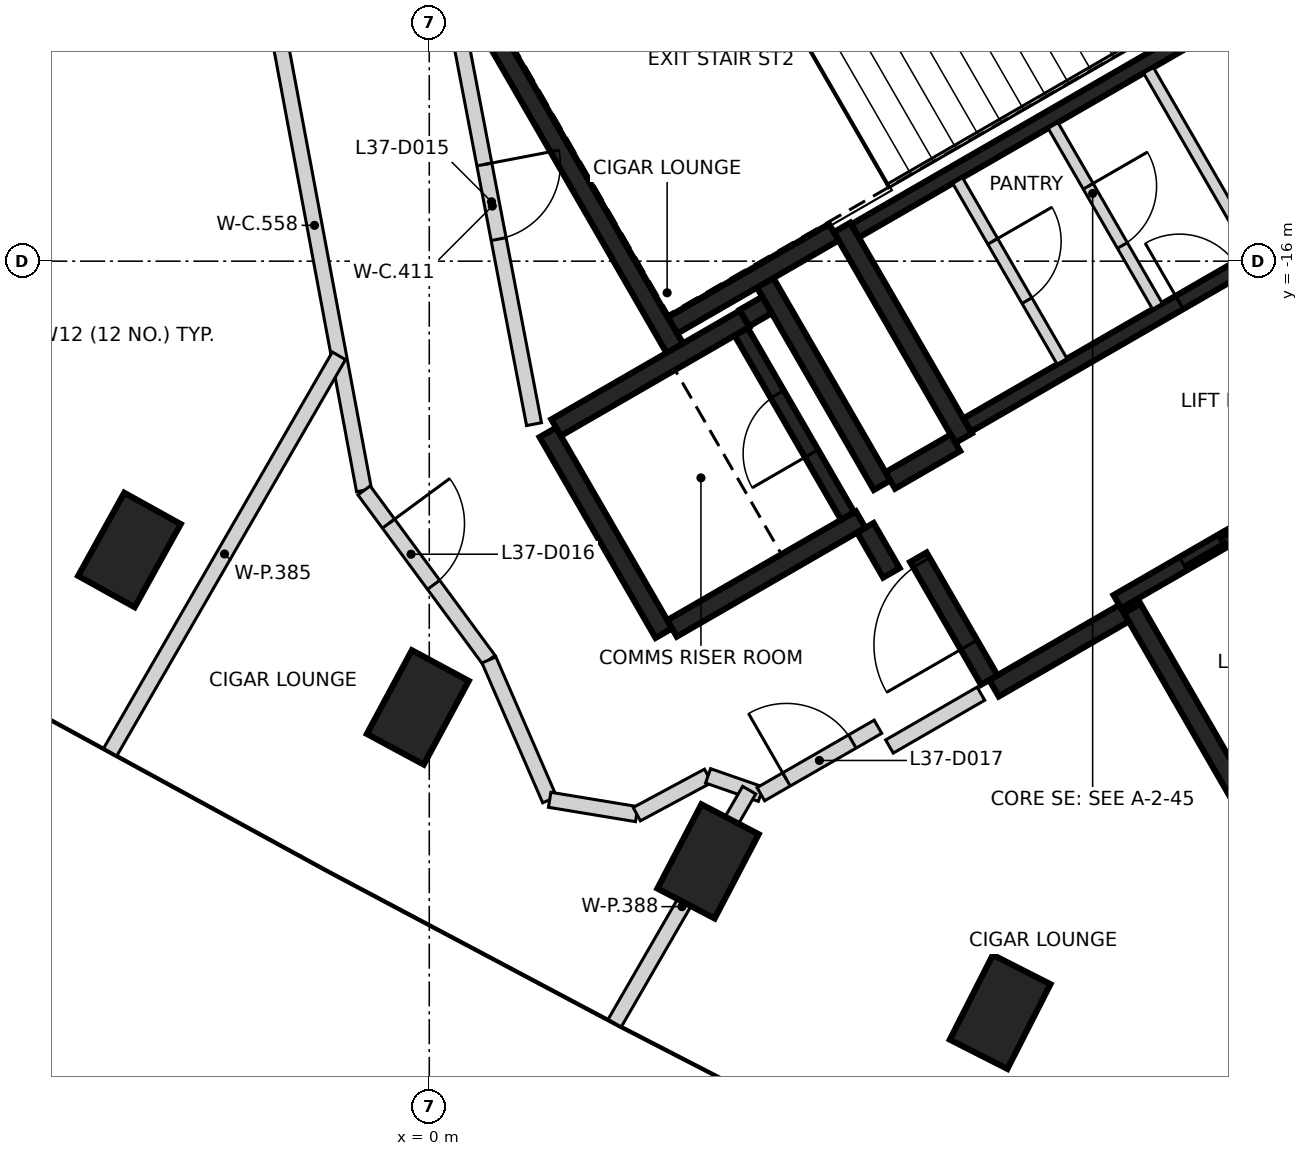
"""IFC4 building model, lengths in metres.
Left out: names, types, materials, properties, quantities, classifications, styles, units other than length and angle.
Written with IfcOpenShell. Run it as: python <this file> out.ifc"""

import sys

from ifc_helpers import new_model, si_unit, direction, frame, frame_2d, origin, origin_2d, place, context, subcontext, project, spatial, rectangle, extrude, element, fill, save


model = new_model("IFC4")
c1 = context("Model", 3, precision=1e-05, world=origin(), true_north=direction((0.0, 1.0)))
c2 = subcontext(c1, "Body", "Model", "MODEL_VIEW")
j1 = project(units=[si_unit("LENGTHUNIT", "METRE"), si_unit("PLANEANGLEUNIT", "RADIAN")], contexts=[c1])
p1 = place(None, origin())
s1 = spatial("IfcSite", under=j1, at=p1, CompositionType="ELEMENT")
p2 = place(p1, origin())
s2 = spatial("IfcBuilding", under=s1, at=p2, CompositionType="ELEMENT")
p3 = place(p2, frame((0.0, 0.0, 150.4)))
s3 = spatial("IfcBuildingStorey", under=s2, at=p3, CompositionType="ELEMENT", Elevation=150.4)
for number, where, z_axis, x_axis in (
    (1, (-3.945, -19.8, -0.4), (0.0, 0.0, 1.0), (0.485, 0.875, 0.0)),
    (2, (-0.151, -21.871, -0.4), (0.0, 0.0, 1.0), (0.474, 0.881, 0.0)),
    (3, (3.667, -23.896, -0.4), (0.0, 0.0, 1.0), (0.463, 0.886, 0.0)),
    (4, (7.51, -25.876, -0.4), (0.0, 0.0, 1.0), (0.453, 0.892, 0.0)),
):
    element("IfcColumn", number, at=place(p3, frame(where, z_axis=z_axis, x_axis=x_axis)), inside=s3, PredefinedType="COLUMN", context=c2, shape_type="SweptSolid", body=[
        extrude(rectangle(XDim=1.25, YDim=0.85, at=origin_2d()), origin(), (0.0, 0.0, 1.0), 3.6),
    ])
p4 = place(p3, frame((3.235, -17.153, 0.0), z_axis=(0.0, 0.0, 1.0), x_axis=(-0.500008851346, 0.866020293397, 0.0)))
e5 = element("IfcWall", 5, at=p4, inside=s3, PredefinedType="SHEAR", context=c2, shape_type="SweptSolid", body=[
    extrude(rectangle(XDim=5.51, YDim=0.25, at=frame_2d((2.755, 0.0))), origin(), (0.0, 0.0, 1.0), 3.2),
])
p5 = place(p3, frame((7.031, -18.327, 0.0), z_axis=(0.0, 0.0, 1.0), x_axis=(-0.499971222258, 0.866042017984, 0.0)))
e6 = element("IfcWall", 6, at=p5, inside=s3, PredefinedType="SHEAR", context=c2, shape_type="SweptSolid", body=[
    extrude(rectangle(XDim=3.2, YDim=0.25, at=frame_2d((1.6, 0.0))), origin(), (0.0, 0.0, 1.0), 3.2),
])
p6 = place(p3, frame((10.736, -23.145, 0.0), z_axis=(0.0, 0.0, 1.0), x_axis=(-0.500023226632, 0.866011993467, 0.0)))
e7 = element("IfcWall", 7, at=p6, inside=s3, PredefinedType="SHEAR", context=c2, shape_type="SweptSolid", body=[
    extrude(rectangle(XDim=2.974, YDim=0.25, at=frame_2d((1.487, 0.0))), origin(), (0.0, 0.0, 1.0), 3.2),
])
p7 = place(p3, frame((3.085, -20.894, 0.0), z_axis=(0.0, 0.0, 1.0), x_axis=(-0.499978833458, 0.866037623948, 0.0)))
e8 = element("IfcWall", 8, at=p7, inside=s3, PredefinedType="SHEAR", context=c2, shape_type="SweptSolid", body=[
    extrude(rectangle(XDim=3.05, YDim=0.25, at=frame_2d((1.525, 0.0))), origin(), (0.0, 0.0, 1.0), 3.2),
])
p8 = place(p3, frame((1.669, -18.19, 0.0), z_axis=(0.0, 0.0, 1.0), x_axis=(0.866042235819, 0.499970844928, 0.0)))
e9 = element("IfcWall", 9, at=p8, inside=s3, PredefinedType="SHEAR", context=c2, shape_type="SweptSolid", body=[
    extrude(rectangle(XDim=2.865, YDim=0.25, at=frame_2d((1.432, 0.0))), origin(), (0.0, 0.0, 1.0), 3.2),
])
p9 = place(p3, frame((5.675, -19.399, 0.0), z_axis=(0.0, 0.0, 1.0), x_axis=(-0.866026637627, -0.499997862916, 0.0)))
e10 = element("IfcWall", 10, at=p9, inside=s3, PredefinedType="SHEAR", context=c2, shape_type="SweptSolid", body=[
    extrude(rectangle(XDim=2.865, YDim=0.25, at=frame_2d((1.432, 0.0))), origin(), (0.0, 0.0, 1.0), 3.2),
])
p10 = place(p3, frame((4.414, -16.276, 0.0), z_axis=(0.0, 0.0, 1.0), x_axis=(0.500003324108, -0.866023484601, 0.0)))
e11 = element("IfcWall", 11, at=p10, inside=s3, PredefinedType="SHEAR", context=c2, shape_type="SweptSolid", body=[
    extrude(rectangle(XDim=3.085, YDim=0.25, at=frame_2d((1.542, 0.0))), origin(), (0.0, 0.0, 1.0), 3.2),
])
p11 = place(p3, frame((5.322, -15.619, 0.0), z_axis=(0.0, 0.0, 1.0), x_axis=(-0.866026229868, -0.499998569178, 0.0)))
e12 = element("IfcWall", 12, at=p11, inside=s3, PredefinedType="SHEAR", context=c2, shape_type="SweptSolid", body=[
    extrude(rectangle(XDim=2.449, YDim=0.25, at=frame_2d((1.225, 0.0))), origin(), (0.0, 0.0, 1.0), 3.2),
])
p12 = place(p3, frame((9.14, -20.631, 0.0), z_axis=(0.0, 0.0, 1.0), x_axis=(-0.866043531843, -0.499968599967, 0.0)))
e13 = element("IfcWall", 13, at=p12, inside=s3, PredefinedType="SHEAR", context=c2, shape_type="SweptSolid", body=[
    extrude(rectangle(XDim=1.975, YDim=0.25, at=frame_2d((0.987, 0.0))), origin(), (0.0, 0.0, 1.0), 3.2),
])
p13 = place(p3, frame((7.367, -21.51, 0.0), z_axis=(0.0, 0.0, 1.0), x_axis=(-0.499983108224, 0.866035156036, 0.0)))
e14 = element("IfcWall", 14, at=p13, inside=s3, PredefinedType="SHEAR", context=c2, shape_type="SweptSolid", body=[
    extrude(rectangle(XDim=1.865, YDim=0.25, at=frame_2d((0.932, 0.0))), origin(), (0.0, 0.0, 1.0), 3.2),
])
p14 = place(p13, frame((0.535, 0.0, 0.0)))
e15 = element("IfcOpeningElement", 15, at=p14, cuts=e14, PredefinedType="OPENING", context=c2, shape_type="SweptSolid", body=[
    extrude(rectangle(XDim=1.25, YDim=2.1, at=frame_2d((0.625, 1.05))), frame((0.0, 0.135, 0.0), z_axis=(0.0, -1.0, 0.0), x_axis=(1.0, 0.0, 0.0)), (0.0, 0.0, 1.0), 0.27),
])
p15 = place(p3, frame((6.065, -18.885, 0.0), z_axis=(0.0, 0.0, 1.0), x_axis=(0.866017078145, 0.500014420154, 0.0)))
e16 = element("IfcWall", 16, at=p15, inside=s3, PredefinedType="SHEAR", context=c2, shape_type="SweptSolid", body=[
    extrude(rectangle(XDim=0.989, YDim=0.25, at=frame_2d((0.495, 0.0))), origin(), (0.0, 0.0, 1.0), 3.2),
])
p16 = place(p3, frame((6.08, -20.1, 0.0), z_axis=(0.0, 0.0, 1.0), x_axis=(-0.500051773299, 0.865995510393, 0.0)))
e17 = element("IfcWall", 17, at=p16, inside=s3, PredefinedType="SHEAR", context=c2, shape_type="SweptSolid", body=[
    extrude(rectangle(XDim=0.685, YDim=0.25, at=frame_2d((0.342, 0.0))), origin(), (0.0, 0.0, 1.0), 3.2),
])
p17 = place(p3, frame((4.145, -16.749, 0.0), z_axis=(0.0, 0.0, 1.0), x_axis=(0.866185586049, 0.49972245349, 0.0)))
e18 = element("IfcWall", 18, at=p17, inside=s3, PredefinedType="SHEAR", context=c2, shape_type="SweptSolid", body=[
    extrude(rectangle(XDim=0.344, YDim=0.25, at=frame_2d((0.172, 0.0))), origin(), (0.0, 0.0, 1.0), 3.2),
])
p18 = place(p3, frame((9.052, -20.48, 0.0), z_axis=(0.0, 0.0, 1.0), x_axis=(0.866030299012, 0.499991521122, 0.0)))
e19 = element("IfcWall", 19, at=p18, inside=s3, PredefinedType="SHEAR", context=c2, shape_type="SweptSolid", body=[
    extrude(rectangle(XDim=6.1, YDim=0.2, at=frame_2d((3.05, 0.0))), origin(), (0.0, 0.0, 1.0), 3.2),
])
p19 = place(p18, frame((1.0, 0.0, 0.0)))
e20 = element("IfcOpeningElement", 20, at=p19, cuts=e19, PredefinedType="OPENING", context=c2, shape_type="SweptSolid", body=[
    extrude(rectangle(XDim=1.2, YDim=2.1, at=frame_2d((0.6, 1.05))), frame((0.0, 0.11, 0.0), z_axis=(0.0, -1.0, 0.0), x_axis=(1.0, 0.0, 0.0)), (0.0, 0.0, 1.0), 0.22),
])
p20 = place(p18, frame((4.05, 0.0, 0.0)))
e21 = element("IfcOpeningElement", 21, at=p20, cuts=e19, PredefinedType="OPENING", context=c2, shape_type="SweptSolid", body=[
    extrude(rectangle(XDim=1.2, YDim=2.1, at=frame_2d((0.6, 1.05))), frame((0.0, 0.11, 0.0), z_axis=(0.0, -1.0, 0.0), x_axis=(1.0, 0.0, 0.0)), (0.0, 0.0, 1.0), 0.22),
])
p21 = place(p3, frame((10.538, -12.752, 0.0), z_axis=(0.0, 0.0, 1.0), x_axis=(-0.866038630372, -0.499977090179, 0.0)))
e22 = element("IfcWall", 22, at=p21, inside=s3, PredefinedType="SHEAR", context=c2, shape_type="SweptSolid", body=[
    extrude(rectangle(XDim=5.699, YDim=0.2, at=frame_2d((2.85, 0.0))), origin(), (0.0, 0.0, 1.0), 3.2),
])
p22 = place(p3, frame((7.077, -18.156, 0.0), z_axis=(0.0, 0.0, 1.0), x_axis=(0.866038630372, 0.499977090179, 0.0)))
e23 = element("IfcWall", 23, at=p22, inside=s3, PredefinedType="SHEAR", context=c2, shape_type="SweptSolid", body=[
    extrude(rectangle(XDim=5.699, YDim=0.2, at=frame_2d((2.85, 0.0))), origin(), (0.0, 0.0, 1.0), 3.2),
])
p23 = place(p22, frame((3.224, 0.0, 0.0)))
e24 = element("IfcOpeningElement", 24, at=p23, cuts=e23, PredefinedType="OPENING", context=c2, shape_type="SweptSolid", body=[
    extrude(rectangle(XDim=0.9, YDim=2.1, at=frame_2d((0.45, 1.05))), frame((0.0, 0.11, 0.0), z_axis=(0.0, -1.0, 0.0), x_axis=(1.0, 0.0, 0.0)), (0.0, 0.0, 1.0), 0.22),
])
p24 = place(p22, frame((4.599, 0.0, 0.0)))
e25 = element("IfcOpeningElement", 25, at=p24, cuts=e23, PredefinedType="OPENING", context=c2, shape_type="SweptSolid", body=[
    extrude(rectangle(XDim=0.9, YDim=2.1, at=frame_2d((0.45, 1.05))), frame((0.0, 0.11, 0.0), z_axis=(0.0, -1.0, 0.0), x_axis=(1.0, 0.0, 0.0)), (0.0, 0.0, 1.0), 0.22),
])
p25 = place(p3, frame((5.503, -19.352, 0.0), z_axis=(0.0, 0.0, 1.0), x_axis=(-0.499986818241, 0.866033014143, 0.0)))
e26 = element("IfcWall", 26, at=p25, inside=s3, PredefinedType="SHEAR", context=c2, shape_type="SweptSolid", body=[
    extrude(rectangle(XDim=2.798, YDim=0.2, at=frame_2d((1.399, 0.0))), origin(), (0.0, 0.0, 1.0), 3.2),
])
p26 = place(p25, frame((0.949, 0.0, 0.0)))
e27 = element("IfcOpeningElement", 27, at=p26, cuts=e26, PredefinedType="OPENING", context=c2, shape_type="SweptSolid", body=[
    extrude(rectangle(XDim=0.9, YDim=2.1, at=frame_2d((0.45, 1.05))), frame((0.0, 0.11, 0.0), z_axis=(0.0, -1.0, 0.0), x_axis=(1.0, 0.0, 0.0)), (0.0, 0.0, 1.0), 0.22),
])
p27 = place(p3, frame((11.963, -15.22, 0.0), z_axis=(0.0, 0.0, 1.0), x_axis=(-0.500034990121, 0.866005201286, 0.0)))
e28 = element("IfcWall", 28, at=p27, inside=s3, PredefinedType="SHEAR", context=c2, shape_type="SweptSolid", body=[
    extrude(rectangle(XDim=2.75, YDim=0.2, at=frame_2d((1.375, 0.0))), origin(), (0.0, 0.0, 1.0), 3.2),
])
p28 = place(p3, frame((8.207, -14.214, 0.0), z_axis=(0.0, 0.0, 1.0), x_axis=(0.50002746344, -0.86600954718, 0.0)))
e29 = element("IfcWall", 29, at=p28, inside=s3, PredefinedType="PARTITIONING", context=c2, shape_type="SweptSolid", body=[
    extrude(rectangle(XDim=2.748, YDim=0.15, at=frame_2d((1.374, 0.0))), origin(), (0.0, 0.0, 1.0), 3.2),
])
p29 = place(p28, frame((0.924, 0.0, 0.0)))
e30 = element("IfcOpeningElement", 30, at=p29, cuts=e29, PredefinedType="OPENING", context=c2, shape_type="SweptSolid", body=[
    extrude(rectangle(XDim=0.9, YDim=2.1, at=frame_2d((0.45, 1.05))), frame((0.0, 0.085, 0.0), z_axis=(0.0, -1.0, 0.0), x_axis=(1.0, 0.0, 0.0)), (0.0, 0.0, 1.0), 0.17),
])
p30 = place(p3, frame((9.462, -13.489, 0.0), z_axis=(0.0, 0.0, 1.0), x_axis=(0.499988999718, -0.866031754707, 0.0)))
e31 = element("IfcWall", 31, at=p30, inside=s3, PredefinedType="PARTITIONING", context=c2, shape_type="SweptSolid", body=[
    extrude(rectangle(XDim=2.749, YDim=0.15, at=frame_2d((1.374, 0.0))), origin(), (0.0, 0.0, 1.0), 3.2),
])
p31 = place(p3, frame((6.951, -14.939, 0.0), z_axis=(0.0, 0.0, 1.0), x_axis=(0.499988999718, -0.866031754707, 0.0)))
e32 = element("IfcWall", 32, at=p31, inside=s3, PredefinedType="PARTITIONING", context=c2, shape_type="SweptSolid", body=[
    extrude(rectangle(XDim=2.749, YDim=0.15, at=frame_2d((1.374, 0.0))), origin(), (0.0, 0.0, 1.0), 3.2),
])
p32 = place(p31, frame((0.924, 0.0, 0.0)))
e33 = element("IfcOpeningElement", 33, at=p32, cuts=e32, PredefinedType="OPENING", context=c2, shape_type="SweptSolid", body=[
    extrude(rectangle(XDim=0.9, YDim=2.1, at=frame_2d((0.45, 1.05))), frame((0.0, 0.085, 0.0), z_axis=(0.0, -1.0, 0.0), x_axis=(1.0, 0.0, 0.0)), (0.0, 0.0, 1.0), 0.17),
])
p33 = place(p3, frame((-2.162, -12.042, 0.0), z_axis=(0.0, 0.0, 1.0), x_axis=(0.18377734651, -0.982967897192, 0.0)))
e34 = element("IfcWall", 34, at=p33, inside=s3, PredefinedType="PARTITIONING", context=c2, shape_type="SweptSolid", body=[
    extrude(rectangle(XDim=7.094, YDim=0.2, at=frame_2d((3.547, 0.0))), origin(), (0.0, 0.0, 1.0), 3.2),
])
p34 = place(p3, frame((-0.858, -19.016, 0.0), z_axis=(0.0, 0.0, 1.0), x_axis=(0.593123867414, -0.805111220829, 0.0)))
e35 = element("IfcWall", 35, at=p34, inside=s3, PredefinedType="PARTITIONING", context=c2, shape_type="SweptSolid", body=[
    extrude(rectangle(XDim=2.77, YDim=0.2, at=frame_2d((1.385, 0.0))), origin(), (0.0, 0.0, 1.0), 3.2),
])
p35 = place(p34, frame((0.542, 0.0, 0.0)))
e36 = element("IfcOpeningElement", 36, at=p35, cuts=e35, PredefinedType="OPENING", context=c2, shape_type="SweptSolid", body=[
    extrude(rectangle(XDim=1.0, YDim=2.1, at=frame_2d((0.5, 1.05))), frame((0.0, 0.11, 0.0), z_axis=(0.0, -1.0, 0.0), x_axis=(1.0, 0.0, 0.0)), (0.0, 0.0, 1.0), 0.22),
])
p36 = place(p3, frame((0.281, -12.406, 0.0), z_axis=(0.0, 0.0, 1.0), x_axis=(0.187814940093, -0.982204433037, 0.0)))
e37 = element("IfcWall", 37, at=p36, inside=s3, PredefinedType="PARTITIONING", context=c2, shape_type="SweptSolid", body=[
    extrude(rectangle(XDim=5.842, YDim=0.2, at=frame_2d((2.921, 0.0))), origin(), (0.0, 0.0, 1.0), 3.2),
])
p37 = place(p36, frame((2.363, 0.0, 0.0)))
e38 = element("IfcOpeningElement", 38, at=p37, cuts=e37, PredefinedType="OPENING", context=c2, shape_type="SweptSolid", body=[
    extrude(rectangle(XDim=1.0, YDim=2.1, at=frame_2d((0.5, 1.05))), frame((0.0, 0.11, 0.0), z_axis=(0.0, -1.0, 0.0), x_axis=(1.0, 0.0, 0.0)), (0.0, 0.0, 1.0), 0.22),
])
p38 = place(p3, frame((0.785, -21.246, 0.0), z_axis=(0.0, 0.0, 1.0), x_axis=(0.398365586627, -0.917226721913, 0.0)))
e39 = element("IfcWall", 39, at=p38, inside=s3, PredefinedType="PARTITIONING", context=c2, shape_type="SweptSolid", body=[
    extrude(rectangle(XDim=2.006, YDim=0.2, at=frame_2d((1.003, 0.0))), origin(), (0.0, 0.0, 1.0), 2.3),
])
p39 = place(p3, frame((1.584, -23.086, 0.0), z_axis=(0.0, 0.0, 1.0), x_axis=(0.986654221629, -0.162829502674, 0.0)))
e40 = element("IfcWall", 40, at=p39, inside=s3, PredefinedType="PARTITIONING", context=c2, shape_type="SweptSolid", body=[
    extrude(rectangle(XDim=1.16, YDim=0.2, at=frame_2d((0.58, 0.0))), origin(), (0.0, 0.0, 1.0), 2.3),
])
p40 = place(p3, frame((2.73, -23.275, 0.0), z_axis=(0.0, 0.0, 1.0), x_axis=(0.880927165636, 0.473251866182, 0.0)))
e41 = element("IfcWall", 41, at=p40, inside=s3, PredefinedType="PARTITIONING", context=c2, shape_type="SweptSolid", body=[
    extrude(rectangle(XDim=1.065, YDim=0.2, at=frame_2d((0.532, 0.0))), origin(), (0.0, 0.0, 1.0), 3.2),
])
p41 = place(p3, frame((3.668, -22.771, 0.0), z_axis=(0.0, 0.0, 1.0), x_axis=(0.944447470761, -0.328662402738, 0.0)))
e42 = element("IfcWall", 42, at=p41, inside=s3, PredefinedType="PARTITIONING", context=c2, shape_type="SweptSolid", body=[
    extrude(rectangle(XDim=0.735, YDim=0.2, at=frame_2d((0.367, 0.0))), origin(), (0.0, 0.0, 1.0), 3.2),
])
p42 = place(p3, frame((4.362, -23.012, 0.0), z_axis=(0.0, 0.0, 1.0), x_axis=(0.866692617793, 0.49884256661, 0.0)))
e43 = element("IfcWall", 43, at=p42, inside=s3, PredefinedType="PARTITIONING", context=c2, shape_type="SweptSolid", body=[
    extrude(rectangle(XDim=1.778, YDim=0.2, at=frame_2d((0.889, 0.0))), origin(), (0.0, 0.0, 1.0), 3.2),
])
p43 = place(p42, frame((0.389, 0.0, 0.0)))
e44 = element("IfcOpeningElement", 44, at=p43, cuts=e43, PredefinedType="OPENING", context=c2, shape_type="SweptSolid", body=[
    extrude(rectangle(XDim=1.0, YDim=2.1, at=frame_2d((0.5, 1.05))), frame((0.0, 0.11, 0.0), z_axis=(0.0, -1.0, 0.0), x_axis=(1.0, 0.0, 0.0)), (0.0, 0.0, 1.0), 0.22),
])
p44 = place(p3, frame((6.054, -22.385, 0.0), z_axis=(0.0, 0.0, 1.0), x_axis=(0.86593101922, 0.500163443238, 0.0)))
e45 = element("IfcWall", 45, at=p44, inside=s3, PredefinedType="PARTITIONING", context=c2, shape_type="SweptSolid", body=[
    extrude(rectangle(XDim=1.39, YDim=0.2, at=frame_2d((0.695, 0.0))), origin(), (0.0, 0.0, 1.0), 3.2),
])
p45 = place(p3, frame((-4.198, -22.459, 0.0), z_axis=(0.0, 0.0, 1.0), x_axis=(0.499899163109, 0.866083614164, 0.0)))
e46 = element("IfcWall", 46, at=p45, inside=s3, PredefinedType="PARTITIONING", context=c2, shape_type="SweptSolid", body=[
    extrude(rectangle(XDim=6.02, YDim=0.2, at=frame_2d((3.01, 0.0))), origin(), (0.0, 0.0, 1.0), 2.3),
])
p46 = place(p3, frame((2.439, -26.024, 0.0), z_axis=(0.0, 0.0, 1.0), x_axis=(0.499989137667, 0.866031675065, 0.0)))
e47 = element("IfcWall", 47, at=p46, inside=s3, PredefinedType="PARTITIONING", context=c2, shape_type="SweptSolid", body=[
    extrude(rectangle(XDim=3.54, YDim=0.2, at=frame_2d((1.77, 0.0))), origin(), (0.0, 0.0, 1.0), 3.2),
])
p47 = place(p19, origin())
e48 = element("IfcDoor", 48, at=p47, inside=s3, OperationType="DOUBLE_DOOR_SLIDING", PredefinedType="DOOR", context=c2, shape_type="SweptSolid", body=[
    extrude(rectangle(XDim=1.2, YDim=2.1, at=frame_2d((0.6, 1.05))), frame((0.0, 0.025, 0.0), z_axis=(0.0, -1.0, 0.0), x_axis=(1.0, 0.0, 0.0)), (0.0, 0.0, 1.0), 0.05),
])
fill(e20, e48)
p48 = place(p14, origin())
e49 = element("IfcDoor", 49, at=p48, inside=s3, OperationType="SINGLE_SWING_LEFT", PredefinedType="DOOR", context=c2, shape_type="SweptSolid", body=[
    extrude(rectangle(XDim=1.25, YDim=2.1, at=frame_2d((0.625, 1.05))), frame((0.0, 0.025, 0.0), z_axis=(0.0, -1.0, 0.0), x_axis=(1.0, 0.0, 0.0)), (0.0, 0.0, 1.0), 0.05),
])
fill(e15, e49)
p49 = place(p23, origin())
e50 = element("IfcDoor", 50, at=p49, inside=s3, OperationType="SINGLE_SWING_LEFT", PredefinedType="DOOR", context=c2, shape_type="SweptSolid", body=[
    extrude(rectangle(XDim=0.9, YDim=2.1, at=frame_2d((0.45, 1.05))), frame((0.0, 0.025, 0.0), z_axis=(0.0, -1.0, 0.0), x_axis=(1.0, 0.0, 0.0)), (0.0, 0.0, 1.0), 0.05),
])
fill(e24, e50)
p50 = place(p26, origin())
e51 = element("IfcDoor", 51, at=p50, inside=s3, OperationType="SINGLE_SWING_LEFT", PredefinedType="DOOR", context=c2, shape_type="SweptSolid", body=[
    extrude(rectangle(XDim=0.9, YDim=2.1, at=frame_2d((0.45, 1.05))), frame((0.0, 0.025, 0.0), z_axis=(0.0, -1.0, 0.0), x_axis=(1.0, 0.0, 0.0)), (0.0, 0.0, 1.0), 0.05),
])
fill(e27, e51)
p51 = place(p29, origin())
e52 = element("IfcDoor", 52, at=p51, inside=s3, OperationType="SINGLE_SWING_RIGHT", PredefinedType="DOOR", context=c2, shape_type="SweptSolid", body=[
    extrude(rectangle(XDim=0.9, YDim=2.1, at=frame_2d((0.45, 1.05))), frame((0.0, 0.025, 0.0), z_axis=(0.0, -1.0, 0.0), x_axis=(1.0, 0.0, 0.0)), (0.0, 0.0, 1.0), 0.05),
])
fill(e30, e52)
p52 = place(p32, origin())
e53 = element("IfcDoor", 53, at=p52, inside=s3, OperationType="SINGLE_SWING_LEFT", PredefinedType="DOOR", context=c2, shape_type="SweptSolid", body=[
    extrude(rectangle(XDim=0.9, YDim=2.1, at=frame_2d((0.45, 1.05))), frame((0.0, 0.025, 0.0), z_axis=(0.0, -1.0, 0.0), x_axis=(1.0, 0.0, 0.0)), (0.0, 0.0, 1.0), 0.05),
])
fill(e33, e53)
p53 = place(p37, origin())
e54 = element("IfcDoor", 54, at=p53, inside=s3, OperationType="SINGLE_SWING_LEFT", PredefinedType="DOOR", context=c2, shape_type="SweptSolid", body=[
    extrude(rectangle(XDim=1.0, YDim=2.1, at=frame_2d((0.5, 1.05))), frame((0.0, 0.025, 0.0), z_axis=(0.0, -1.0, 0.0), x_axis=(1.0, 0.0, 0.0)), (0.0, 0.0, 1.0), 0.05),
])
fill(e38, e54)
p54 = place(p35, frame((1.0, 0.0, 0.0), z_axis=(0.0, 0.0, 1.0), x_axis=(-1.0, 0.0, 0.0)))
e55 = element("IfcDoor", 55, at=p54, inside=s3, OperationType="SINGLE_SWING_LEFT", PredefinedType="DOOR", context=c2, shape_type="SweptSolid", body=[
    extrude(rectangle(XDim=1.0, YDim=2.1, at=frame_2d((0.5, 1.05))), frame((0.0, 0.025, 0.0), z_axis=(0.0, -1.0, 0.0), x_axis=(1.0, 0.0, 0.0)), (0.0, 0.0, 1.0), 0.05),
])
fill(e36, e55)
p55 = place(p43, frame((1.0, 0.0, 0.0), z_axis=(0.0, 0.0, 1.0), x_axis=(-1.0, 0.0, 0.0)))
e56 = element("IfcDoor", 56, at=p55, inside=s3, OperationType="SINGLE_SWING_LEFT", PredefinedType="DOOR", context=c2, shape_type="SweptSolid", body=[
    extrude(rectangle(XDim=1.0, YDim=2.1, at=frame_2d((0.5, 1.05))), frame((0.0, 0.025, 0.0), z_axis=(0.0, -1.0, 0.0), x_axis=(1.0, 0.0, 0.0)), (0.0, 0.0, 1.0), 0.05),
])
fill(e44, e56)
save(model, sys.argv[1])
